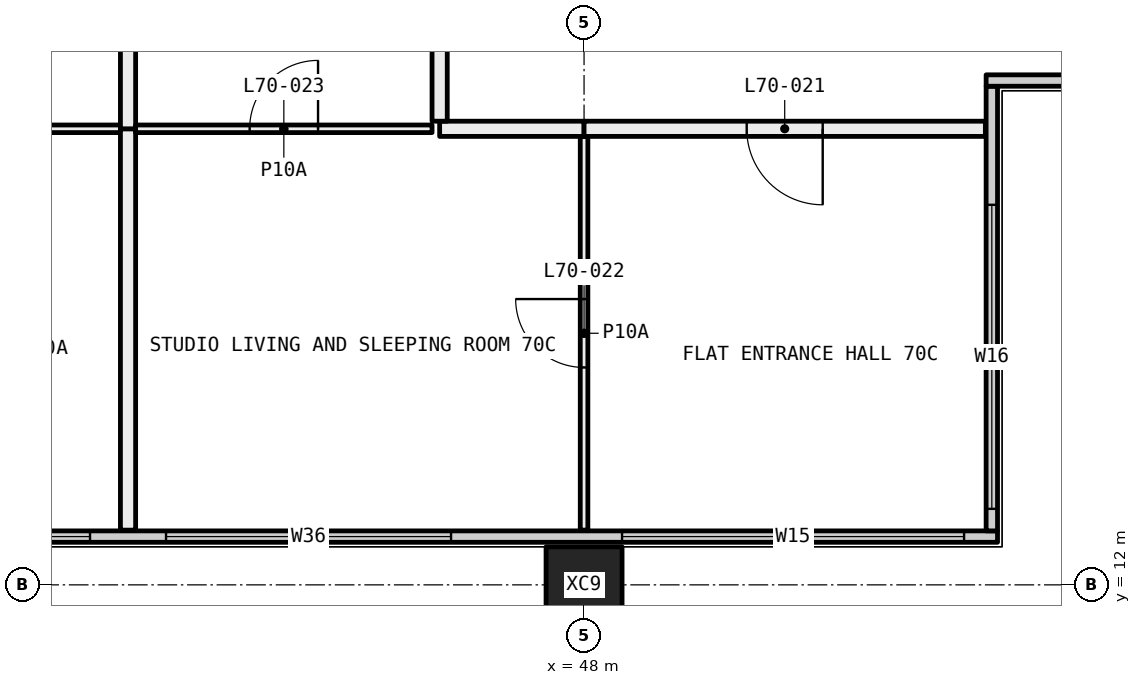
"""IFC4 building model, lengths in metres.
Left out: names, types, materials, properties, quantities, classifications, styles, units other than length and angle.
Written with IfcOpenShell. Run it as: python <this file> out.ifc"""

import sys

from ifc_helpers import new_model, si_unit, direction, frame, frame_2d, origin, origin_2d, place, context, subcontext, project, spatial, rectangle, hollow_rectangle, extrude, element, fill, save


model = new_model("IFC4")
c1 = context("Model", 3, precision=1e-05, world=origin(), true_north=direction((0.0, 1.0)))
c2 = subcontext(c1, "Body", "Model", "MODEL_VIEW")
j1 = project(units=[si_unit("LENGTHUNIT", "METRE"), si_unit("PLANEANGLEUNIT", "RADIAN")], contexts=[c1])
p1 = place(None, origin())
s1 = spatial("IfcSite", under=j1, at=p1, CompositionType="ELEMENT")
p2 = place(p1, origin())
s2 = spatial("IfcBuilding", under=s1, at=p2, CompositionType="ELEMENT")
p3 = place(p2, frame((0.0, 0.0, 259.35)))
s3 = spatial("IfcBuildingStorey", under=s2, at=p3, CompositionType="ELEMENT", Elevation=259.35)
p4 = place(p3, frame((48.0, 12.0, -0.4), z_axis=(0.0, 0.0, 1.0), x_axis=(1.0, 0.0, 0.0)))
e1 = element("IfcColumn", 1, at=p4, inside=s3, PredefinedType="COLUMN", context=c2, shape_type="SweptSolid", body=[
    extrude(hollow_rectangle(XDim=1.0, YDim=1.0, WallThickness=0.036, at=origin_2d()), origin(), (0.0, 0.0, 1.0), 3.45),
])
p5 = place(p3, frame((18.56, 12.635, 0.0), z_axis=(0.0, 0.0, 1.0), x_axis=(1.0, 0.0, 0.0)))
e2 = element("IfcWall", 2, at=p5, inside=s3, PredefinedType="ELEMENTEDWALL", context=c2, shape_type="SweptSolid", body=[
    extrude(rectangle(XDim=34.88, YDim=0.15, at=frame_2d((17.44, 0.0))), origin(), (0.0, 0.0, 1.0), 3.05),
])
p6 = place(p5, frame((0.44, 0.0, 0.45)))
e3 = element("IfcOpeningElement", 3, at=p6, cuts=e2, PredefinedType="OPENING", context=c2, shape_type="SweptSolid", body=[
    extrude(rectangle(XDim=4.5, YDim=2.55, at=frame_2d((2.25, 1.275))), frame((0.0, 0.085, 0.0), z_axis=(0.0, -1.0, 0.0), x_axis=(1.0, 0.0, 0.0)), (0.0, 0.0, 1.0), 0.17),
])
p7 = place(p5, frame((7.19, 0.0, 0.45)))
e4 = element("IfcOpeningElement", 4, at=p7, cuts=e2, PredefinedType="OPENING", context=c2, shape_type="SweptSolid", body=[
    extrude(rectangle(XDim=3.75, YDim=2.55, at=frame_2d((1.875, 1.275))), frame((0.0, 0.085, 0.0), z_axis=(0.0, -1.0, 0.0), x_axis=(1.0, 0.0, 0.0)), (0.0, 0.0, 1.0), 0.17),
])
p8 = place(p5, frame((11.94, 0.0, 0.45)))
e5 = element("IfcOpeningElement", 5, at=p8, cuts=e2, PredefinedType="OPENING", context=c2, shape_type="SweptSolid", body=[
    extrude(rectangle(XDim=2.0, YDim=2.55, at=frame_2d((1.0, 1.275))), frame((0.0, 0.085, 0.0), z_axis=(0.0, -1.0, 0.0), x_axis=(1.0, 0.0, 0.0)), (0.0, 0.0, 1.0), 0.17),
])
p9 = place(p5, frame((14.94, 0.0, 0.45)))
e6 = element("IfcOpeningElement", 6, at=p9, cuts=e2, PredefinedType="OPENING", context=c2, shape_type="SweptSolid", body=[
    extrude(rectangle(XDim=0.75, YDim=2.55, at=frame_2d((0.375, 1.275))), frame((0.0, 0.085, 0.0), z_axis=(0.0, -1.0, 0.0), x_axis=(1.0, 0.0, 0.0)), (0.0, 0.0, 1.0), 0.17),
])
p10 = place(p5, frame((19.19, 0.0, 0.45)))
e7 = element("IfcOpeningElement", 7, at=p10, cuts=e2, PredefinedType="OPENING", context=c2, shape_type="SweptSolid", body=[
    extrude(rectangle(XDim=3.75, YDim=2.55, at=frame_2d((1.875, 1.275))), frame((0.0, 0.085, 0.0), z_axis=(0.0, -1.0, 0.0), x_axis=(1.0, 0.0, 0.0)), (0.0, 0.0, 1.0), 0.17),
])
p11 = place(p5, frame((23.94, 0.0, 0.45)))
e8 = element("IfcOpeningElement", 8, at=p11, cuts=e2, PredefinedType="OPENING", context=c2, shape_type="SweptSolid", body=[
    extrude(rectangle(XDim=3.75, YDim=2.55, at=frame_2d((1.875, 1.275))), frame((0.0, 0.085, 0.0), z_axis=(0.0, -1.0, 0.0), x_axis=(1.0, 0.0, 0.0)), (0.0, 0.0, 1.0), 0.17),
])
p12 = place(p5, frame((29.94, 0.0, 0.45)))
e9 = element("IfcOpeningElement", 9, at=p12, cuts=e2, PredefinedType="OPENING", context=c2, shape_type="SweptSolid", body=[
    extrude(rectangle(XDim=4.5, YDim=2.55, at=frame_2d((2.25, 1.275))), frame((0.0, 0.085, 0.0), z_axis=(0.0, -1.0, 0.0), x_axis=(1.0, 0.0, 0.0)), (0.0, 0.0, 1.0), 0.17),
])
p13 = place(p3, frame((53.365, 12.71, 0.0), z_axis=(0.0, 0.0, 1.0), x_axis=(0.0, 1.0, 0.0)))
e10 = element("IfcWall", 10, at=p13, inside=s3, PredefinedType="ELEMENTEDWALL", context=c2, shape_type="SweptSolid", body=[
    extrude(rectangle(XDim=5.85, YDim=0.15, at=frame_2d((2.925, 0.0))), origin(), (0.0, 0.0, 1.0), 3.05),
])
p14 = place(p13, frame((0.29, 0.0, 0.45)))
e11 = element("IfcOpeningElement", 11, at=p14, cuts=e10, PredefinedType="OPENING", context=c2, shape_type="SweptSolid", body=[
    extrude(rectangle(XDim=4.0, YDim=2.55, at=frame_2d((2.0, 1.275))), frame((0.0, 0.085, 0.0), z_axis=(0.0, -1.0, 0.0), x_axis=(1.0, 0.0, 0.0)), (0.0, 0.0, 1.0), 0.17),
])
p15 = place(p3, frame((53.29, 18.635, 0.0), z_axis=(0.0, 0.0, 1.0), x_axis=(1.0, 0.0, 0.0)))
e12 = element("IfcWall", 12, at=p15, inside=s3, PredefinedType="ELEMENTEDWALL", context=c2, shape_type="SweptSolid", body=[
    extrude(rectangle(XDim=6.15, YDim=0.15, at=frame_2d((3.075, 0.0))), origin(), (0.0, 0.0, 1.0), 3.05),
])
p16 = place(p15, frame((1.71, 0.0, 0.45)))
e13 = element("IfcOpeningElement", 13, at=p16, cuts=e12, PredefinedType="OPENING", context=c2, shape_type="SweptSolid", body=[
    extrude(rectangle(XDim=4.0, YDim=2.55, at=frame_2d((2.0, 1.275))), frame((0.0, 0.085, 0.0), z_axis=(0.0, -1.0, 0.0), x_axis=(1.0, 0.0, 0.0)), (0.0, 0.0, 1.0), 0.17),
])
p17 = place(p3, frame((41.9, 18.0, 0.0), z_axis=(0.0, 0.0, 1.0), x_axis=(-1.0, 0.0, 0.0)))
e14 = element("IfcWall", 14, at=p17, inside=s3, PredefinedType="PARTITIONING", context=c2, shape_type="SweptSolid", body=[
    extrude(rectangle(XDim=5.85, YDim=0.1, at=frame_2d((2.925, 0.0))), origin(), (0.0, 0.0, 1.0), 2.45),
])
p18 = place(p17, frame((2.475, 0.0, 0.0)))
e15 = element("IfcOpeningElement", 15, at=p18, cuts=e14, PredefinedType="OPENING", context=c2, shape_type="SweptSolid", body=[
    extrude(rectangle(XDim=0.9, YDim=2.1, at=frame_2d((0.45, 1.05))), frame((0.0, 0.06, 0.0), z_axis=(0.0, -1.0, 0.0), x_axis=(1.0, 0.0, 0.0)), (0.0, 0.0, 1.0), 0.12),
])
p19 = place(p3, frame((42.0, 12.72, 0.0), z_axis=(0.0, 0.0, 1.0), x_axis=(0.0, 1.0, 0.0)))
e16 = element("IfcWall", 16, at=p19, inside=s3, PredefinedType="PARTITIONING", context=c2, shape_type="SweptSolid", body=[
    extrude(rectangle(XDim=5.28, YDim=0.2, at=frame_2d((2.64, 0.0))), origin(), (0.0, 0.0, 1.0), 3.05),
])
p20 = place(p3, frame((42.0, 18.0, 0.0), z_axis=(0.0, 0.0, 1.0), x_axis=(0.0, 1.0, 0.0)))
e17 = element("IfcWall", 17, at=p20, inside=s3, PredefinedType="PARTITIONING", context=c2, shape_type="SweptSolid", body=[
    extrude(rectangle(XDim=6.3, YDim=0.2, at=frame_2d((3.15, 0.0))), origin(), (0.0, 0.0, 1.0), 2.45),
])
p21 = place(p3, frame((48.0, 12.72, 0.0), z_axis=(0.0, 0.0, 1.0), x_axis=(0.0, 1.0, 0.0)))
e18 = element("IfcWall", 18, at=p21, inside=s3, PredefinedType="PARTITIONING", context=c2, shape_type="SweptSolid", body=[
    extrude(rectangle(XDim=5.18, YDim=0.1, at=frame_2d((2.59, 0.0))), origin(), (0.0, 0.0, 1.0), 3.05),
])
p22 = place(p21, frame((2.14, 0.0, 0.0)))
e19 = element("IfcOpeningElement", 19, at=p22, cuts=e18, PredefinedType="OPENING", context=c2, shape_type="SweptSolid", body=[
    extrude(rectangle(XDim=0.9, YDim=2.1, at=frame_2d((0.45, 1.05))), frame((0.0, 0.06, 0.0), z_axis=(0.0, -1.0, 0.0), x_axis=(1.0, 0.0, 0.0)), (0.0, 0.0, 1.0), 0.12),
])
p23 = place(p3, frame((46.0, 18.0, 0.0), z_axis=(0.0, 0.0, 1.0), x_axis=(-1.0, 0.0, 0.0)))
e20 = element("IfcWall", 20, at=p23, inside=s3, PredefinedType="PARTITIONING", context=c2, shape_type="SweptSolid", body=[
    extrude(rectangle(XDim=3.9, YDim=0.1, at=frame_2d((1.95, 0.0))), origin(), (0.0, 0.0, 1.0), 3.05),
])
p24 = place(p23, frame((1.5, 0.0, 0.0)))
e21 = element("IfcOpeningElement", 21, at=p24, cuts=e20, PredefinedType="OPENING", context=c2, shape_type="SweptSolid", body=[
    extrude(rectangle(XDim=0.9, YDim=2.1, at=frame_2d((0.45, 1.05))), frame((0.0, 0.06, 0.0), z_axis=(0.0, -1.0, 0.0), x_axis=(1.0, 0.0, 0.0)), (0.0, 0.0, 1.0), 0.12),
])
p25 = place(p3, frame((48.0, 18.0, 0.0), z_axis=(0.0, 0.0, 1.0), x_axis=(-1.0, 0.0, 0.0)))
e22 = element("IfcWall", 22, at=p25, inside=s3, PredefinedType="PARTITIONING", context=c2, shape_type="SweptSolid", body=[
    extrude(rectangle(XDim=1.9, YDim=0.2, at=frame_2d((0.95, 0.0))), origin(), (0.0, 0.0, 1.0), 3.05),
])
p26 = place(p3, frame((53.28, 18.0, 0.0), z_axis=(0.0, 0.0, 1.0), x_axis=(-1.0, 0.0, 0.0)))
e23 = element("IfcWall", 23, at=p26, inside=s3, PredefinedType="PARTITIONING", context=c2, shape_type="SweptSolid", body=[
    extrude(rectangle(XDim=5.28, YDim=0.2, at=frame_2d((2.64, 0.0))), origin(), (0.0, 0.0, 1.0), 3.05),
])
p27 = place(p26, frame((2.14, 0.0, 0.0)))
e24 = element("IfcOpeningElement", 24, at=p27, cuts=e23, PredefinedType="OPENING", context=c2, shape_type="SweptSolid", body=[
    extrude(rectangle(XDim=1.0, YDim=2.1, at=frame_2d((0.5, 1.05))), frame((0.0, 0.11, 0.0), z_axis=(0.0, -1.0, 0.0), x_axis=(1.0, 0.0, 0.0)), (0.0, 0.0, 1.0), 0.22),
])
p28 = place(p3, frame((46.1, 18.1, 0.0), z_axis=(0.0, 0.0, 1.0), x_axis=(0.0, 1.0, 0.0)))
e25 = element("IfcWall", 25, at=p28, inside=s3, PredefinedType="PARTITIONING", context=c2, shape_type="SweptSolid", body=[
    extrude(rectangle(XDim=6.2, YDim=0.2, at=frame_2d((3.1, 0.0))), origin(), (0.0, 0.0, 1.0), 2.45),
])
p29 = place(p10, origin())
e26 = element("IfcWindow", 26, at=p29, inside=s3, PartitioningType="SINGLE_PANEL", PredefinedType="WINDOW", context=c2, shape_type="SweptSolid", body=[
    extrude(rectangle(XDim=3.75, YDim=2.55, at=frame_2d((1.875, 1.275))), frame((0.0, 0.03, 0.0), z_axis=(0.0, -1.0, 0.0), x_axis=(1.0, 0.0, 0.0)), (0.0, 0.0, 1.0), 0.06),
])
fill(e7, e26)
p30 = place(p11, origin())
e27 = element("IfcWindow", 27, at=p30, inside=s3, PartitioningType="SINGLE_PANEL", PredefinedType="WINDOW", context=c2, shape_type="SweptSolid", body=[
    extrude(rectangle(XDim=3.75, YDim=2.55, at=frame_2d((1.875, 1.275))), frame((0.0, 0.03, 0.0), z_axis=(0.0, -1.0, 0.0), x_axis=(1.0, 0.0, 0.0)), (0.0, 0.0, 1.0), 0.06),
])
fill(e8, e27)
p31 = place(p12, origin())
e28 = element("IfcWindow", 28, at=p31, inside=s3, PartitioningType="SINGLE_PANEL", PredefinedType="WINDOW", context=c2, shape_type="SweptSolid", body=[
    extrude(rectangle(XDim=4.5, YDim=2.55, at=frame_2d((2.25, 1.275))), frame((0.0, 0.03, 0.0), z_axis=(0.0, -1.0, 0.0), x_axis=(1.0, 0.0, 0.0)), (0.0, 0.0, 1.0), 0.06),
])
fill(e9, e28)
p32 = place(p14, origin())
e29 = element("IfcWindow", 29, at=p32, inside=s3, PartitioningType="SINGLE_PANEL", PredefinedType="WINDOW", context=c2, shape_type="SweptSolid", body=[
    extrude(rectangle(XDim=4.0, YDim=2.55, at=frame_2d((2.0, 1.275))), frame((0.0, 0.03, 0.0), z_axis=(0.0, -1.0, 0.0), x_axis=(1.0, 0.0, 0.0)), (0.0, 0.0, 1.0), 0.06),
])
fill(e11, e29)
p33 = place(p27, origin())
e30 = element("IfcDoor", 30, at=p33, inside=s3, OperationType="SINGLE_SWING_RIGHT", PredefinedType="DOOR", context=c2, shape_type="SweptSolid", body=[
    extrude(rectangle(XDim=1.0, YDim=2.1, at=frame_2d((0.5, 1.05))), frame((0.0, 0.025, 0.0), z_axis=(0.0, -1.0, 0.0), x_axis=(1.0, 0.0, 0.0)), (0.0, 0.0, 1.0), 0.05),
])
fill(e24, e30)
p34 = place(p22, origin())
e31 = element("IfcDoor", 31, at=p34, inside=s3, OperationType="SINGLE_SWING_LEFT", PredefinedType="DOOR", context=c2, shape_type="SweptSolid", body=[
    extrude(rectangle(XDim=0.9, YDim=2.1, at=frame_2d((0.45, 1.05))), frame((0.0, 0.025, 0.0), z_axis=(0.0, -1.0, 0.0), x_axis=(1.0, 0.0, 0.0)), (0.0, 0.0, 1.0), 0.05),
])
fill(e19, e31)
p35 = place(p24, frame((0.9, 0.0, 0.0), x_axis=(-1.0, 0.0, 0.0)))
e32 = element("IfcDoor", 32, at=p35, inside=s3, OperationType="SINGLE_SWING_LEFT", PredefinedType="DOOR", context=c2, shape_type="SweptSolid", body=[
    extrude(rectangle(XDim=0.9, YDim=2.1, at=frame_2d((0.45, 1.05))), frame((0.0, 0.025, 0.0), z_axis=(0.0, -1.0, 0.0), x_axis=(1.0, 0.0, 0.0)), (0.0, 0.0, 1.0), 0.05),
])
fill(e21, e32)
save(model, sys.argv[1])
